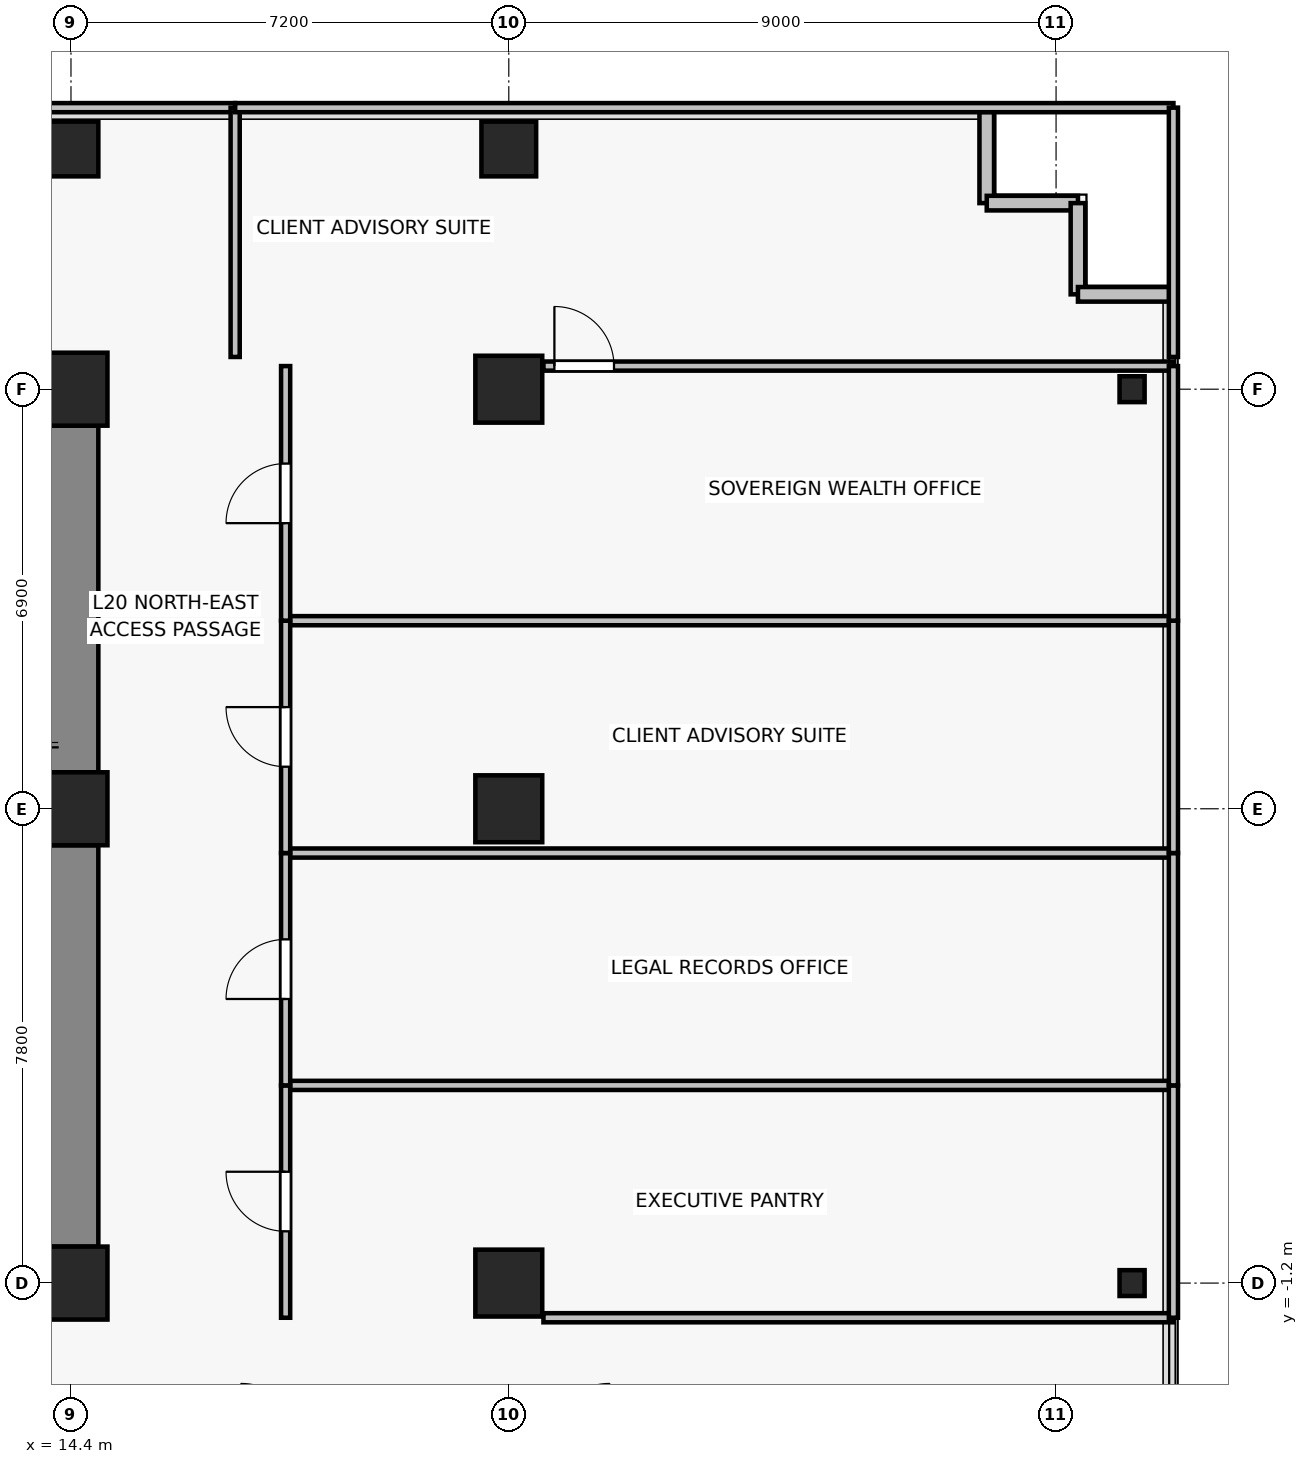
"""IFC4 building model, lengths in metres.
Left out: names, types, materials, properties, quantities, classifications, styles, units other than length and angle.
Written with IfcOpenShell. Run it as: python <this file> out.ifc"""

import sys

from ifc_helpers import new_model, si_unit, direction, frame, frame_2d, origin, origin_2d, place, context, subcontext, project, spatial, rectangle, i_section, extrude, source, transform, mapped, element, fill, save


model = new_model("IFC4")
c1 = context("Model", 3, precision=1e-05, world=origin(), true_north=direction((0.0, 1.0)))
c2 = subcontext(c1, "Body", "Model", "MODEL_VIEW")
j1 = project(units=[si_unit("LENGTHUNIT", "METRE"), si_unit("PLANEANGLEUNIT", "RADIAN")], contexts=[c1])
p1 = place(None, origin())
s1 = spatial("IfcSite", under=j1, at=p1, CompositionType="ELEMENT")
p2 = place(p1, origin())
s2 = spatial("IfcBuilding", under=s1, at=p2, CompositionType="ELEMENT")
p3 = place(p2, frame((0.0, 0.0, 73.6)))
s3 = spatial("IfcBuildingStorey", under=s2, at=p3, CompositionType="ELEMENT", Elevation=73.6)
for number, where, z_axis, x_axis in (
    (1, (14.4, -1.2, 0.0), (0.0, 0.0, 1.0), (1.0, 0.0, 0.0)),
    (2, (14.4, 6.6, 0.0), (0.0, 0.0, 1.0), (1.0, 0.0, 0.0)),
    (3, (14.4, 13.5, 0.0), (0.0, 0.0, 1.0), (1.0, 0.0, 0.0)),
):
    element("IfcColumn", number, at=place(p3, frame(where, z_axis=z_axis, x_axis=x_axis)), inside=s3, PredefinedType="COLUMN", context=c2, shape_type="SweptSolid", body=[
        extrude(rectangle(XDim=1.2, YDim=1.2, at=origin_2d()), origin(), (0.0, 0.0, 1.0), 3.3),
    ])
for number, where, z_axis, x_axis in (
    (4, (21.6, -1.2, 0.0), (0.0, 0.0, 1.0), (1.0, 0.0, 0.0)),
    (5, (21.6, 6.6, 0.0), (0.0, 0.0, 1.0), (1.0, 0.0, 0.0)),
    (6, (21.6, 13.5, 0.0), (0.0, 0.0, 1.0), (1.0, 0.0, 0.0)),
):
    element("IfcColumn", number, at=place(p3, frame(where, z_axis=z_axis, x_axis=x_axis)), inside=s3, PredefinedType="COLUMN", context=c2, shape_type="SweptSolid", body=[
        extrude(rectangle(XDim=1.1, YDim=1.1, at=origin_2d()), origin(), (0.0, 0.0, 1.0), 3.3),
    ])
for number, where, z_axis, x_axis in (
    (7, (14.4, 17.45, 0.0), (0.0, 0.0, 1.0), (1.0, 0.0, 0.0)),
    (8, (21.6, 17.45, 0.0), (0.0, 0.0, 1.0), (1.0, 0.0, 0.0)),
):
    element("IfcColumn", number, at=place(p3, frame(where, z_axis=z_axis, x_axis=x_axis)), inside=s3, PredefinedType="COLUMN", context=c2, shape_type="SweptSolid", body=[
        extrude(rectangle(XDim=0.9, YDim=0.9, at=origin_2d()), origin(), (0.0, 0.0, 1.0), 3.3),
    ])
for number, where, z_axis, x_axis in (
    (9, (31.85, -1.2, 0.0), (0.0, 0.0, 1.0), (1.0, 0.0, 0.0)),
    (10, (31.85, 13.5, 0.0), (0.0, 0.0, 1.0), (1.0, 0.0, 0.0)),
):
    element("IfcColumn", number, at=place(p3, frame(where, z_axis=z_axis, x_axis=x_axis)), inside=s3, PredefinedType="COLUMN", context=c2, shape_type="SweptSolid", body=[
        extrude(i_section(OverallWidth=0.412, OverallDepth=0.425, WebThickness=0.026, FlangeThickness=0.039, FilletRadius=0.015, at=origin_2d()), origin(), (0.0, 0.0, 1.0), 3.3),
    ])
p4 = place(p3, frame((14.4, -0.6, 0.0), z_axis=(0.0, 0.0, 1.0), x_axis=(0.0, 1.0, 0.0)))
e11 = element("IfcWall", 11, at=p4, inside=s3, PredefinedType="SHEAR", context=c2, shape_type="SweptSolid", body=[
    extrude(rectangle(XDim=6.6, YDim=0.9, at=frame_2d((3.3, 0.0))), origin(), (0.0, 0.0, 1.0), 3.075),
])
p5 = place(p3, frame((14.4, 7.2, 0.0), z_axis=(0.0, 0.0, 1.0), x_axis=(0.0, 1.0, 0.0)))
e12 = element("IfcWall", 12, at=p5, inside=s3, PredefinedType="SHEAR", context=c2, shape_type="SweptSolid", body=[
    extrude(rectangle(XDim=5.7, YDim=0.9, at=frame_2d((2.85, 0.0))), origin(), (0.0, 0.0, 1.0), 3.075),
])
for number, where, z_axis, x_axis in (
    (13, (29.46, 16.56, 0.0), (0.0, 0.0, 1.0), (0.0, 1.0, 0.0)),
    (14, (30.96, 16.56, 0.0), (0.0, 0.0, 1.0), (-1.0, 0.0, 0.0)),
    (15, (30.96, 15.06, 0.0), (0.0, 0.0, 1.0), (0.0, 1.0, 0.0)),
    (16, (32.46, 15.06, 0.0), (0.0, 0.0, 1.0), (-1.0, 0.0, 0.0)),
):
    element("IfcWall", number, at=place(p3, frame(where, z_axis=z_axis, x_axis=x_axis)), inside=s3, PredefinedType="SOLIDWALL", context=c2, shape_type="SweptSolid", body=[
        extrude(rectangle(XDim=1.5, YDim=0.24, at=frame_2d((0.75, 0.0))), origin(), (0.0, 0.0, 1.0), 3.075),
    ])
p6 = place(p3, frame((32.53, -1.77, 0.0), z_axis=(0.0, 0.0, 1.0), x_axis=(-1.0, 0.0, 0.0)))
e17 = element("IfcWall", 17, at=p6, inside=s3, PredefinedType="PARTITIONING", context=c2, shape_type="SweptSolid", body=[
    extrude(rectangle(XDim=10.36, YDim=0.15, at=frame_2d((5.18, 0.0))), origin(), (0.0, 0.0, 1.0), 2.465),
])
p7 = place(p3, frame((17.93, 2.051, 0.0), z_axis=(0.0, 0.0, 1.0), x_axis=(1.0, 0.0, 0.0)))
e18 = element("IfcWall", 18, at=p7, inside=s3, PredefinedType="PARTITIONING", context=c2, shape_type="SweptSolid", body=[
    extrude(rectangle(XDim=14.6, YDim=0.15, at=frame_2d((7.3, 0.0))), origin(), (0.0, 0.0, 1.0), 2.465),
])
p8 = place(p3, frame((17.93, -1.77, 0.0), z_axis=(0.0, 0.0, 1.0), x_axis=(0.0, 1.0, 0.0)))
e19 = element("IfcWall", 19, at=p8, inside=s3, PredefinedType="PARTITIONING", context=c2, shape_type="SweptSolid", body=[
    extrude(rectangle(XDim=3.821, YDim=0.15, at=frame_2d((1.911, 0.0))), origin(), (0.0, 0.0, 1.0), 2.465),
])
p9 = place(p8, frame((1.421, 0.0, 0.0)))
e20 = element("IfcOpeningElement", 20, at=p9, cuts=e19, PredefinedType="OPENING", context=c2, shape_type="SweptSolid", body=[
    extrude(rectangle(XDim=0.98, YDim=2.15, at=frame_2d((0.49, 1.075))), frame((0.0, 0.085, 0.0), z_axis=(0.0, -1.0, 0.0), x_axis=(1.0, 0.0, 0.0)), (0.0, 0.0, 1.0), 0.17),
])
p10 = place(p3, frame((32.53, 2.051, 0.0), z_axis=(0.0, 0.0, 1.0), x_axis=(0.0, -1.0, 0.0)))
e21 = element("IfcWall", 21, at=p10, inside=s3, PredefinedType="PARTITIONING", context=c2, shape_type="SweptSolid", body=[
    extrude(rectangle(XDim=3.821, YDim=0.15, at=frame_2d((1.911, 0.0))), origin(), (0.0, 0.0, 1.0), 3.075),
])
p11 = place(p3, frame((17.93, 5.872, 0.0), z_axis=(0.0, 0.0, 1.0), x_axis=(1.0, 0.0, 0.0)))
e22 = element("IfcWall", 22, at=p11, inside=s3, PredefinedType="PARTITIONING", context=c2, shape_type="SweptSolid", body=[
    extrude(rectangle(XDim=14.6, YDim=0.15, at=frame_2d((7.3, 0.0))), origin(), (0.0, 0.0, 1.0), 2.465),
])
p12 = place(p3, frame((17.93, 2.051, 0.0), z_axis=(0.0, 0.0, 1.0), x_axis=(0.0, 1.0, 0.0)))
e23 = element("IfcWall", 23, at=p12, inside=s3, PredefinedType="PARTITIONING", context=c2, shape_type="SweptSolid", body=[
    extrude(rectangle(XDim=3.821, YDim=0.15, at=frame_2d((1.911, 0.0))), origin(), (0.0, 0.0, 1.0), 3.075),
])
p13 = place(p12, frame((1.421, 0.0, 0.0)))
e24 = element("IfcOpeningElement", 24, at=p13, cuts=e23, PredefinedType="OPENING", context=c2, shape_type="SweptSolid", body=[
    extrude(rectangle(XDim=0.98, YDim=2.15, at=frame_2d((0.49, 1.075))), frame((0.0, 0.085, 0.0), z_axis=(0.0, -1.0, 0.0), x_axis=(1.0, 0.0, 0.0)), (0.0, 0.0, 1.0), 0.17),
])
p14 = place(p3, frame((32.53, 5.872, 0.0), z_axis=(0.0, 0.0, 1.0), x_axis=(0.0, -1.0, 0.0)))
e25 = element("IfcWall", 25, at=p14, inside=s3, PredefinedType="PARTITIONING", context=c2, shape_type="SweptSolid", body=[
    extrude(rectangle(XDim=3.821, YDim=0.15, at=frame_2d((1.911, 0.0))), origin(), (0.0, 0.0, 1.0), 3.075),
])
p15 = place(p3, frame((17.93, 9.693, 0.0), z_axis=(0.0, 0.0, 1.0), x_axis=(1.0, 0.0, 0.0)))
e26 = element("IfcWall", 26, at=p15, inside=s3, PredefinedType="PARTITIONING", context=c2, shape_type="SweptSolid", body=[
    extrude(rectangle(XDim=14.6, YDim=0.15, at=frame_2d((7.3, 0.0))), origin(), (0.0, 0.0, 1.0), 2.465),
])
p16 = place(p3, frame((17.93, 5.872, 0.0), z_axis=(0.0, 0.0, 1.0), x_axis=(0.0, 1.0, 0.0)))
e27 = element("IfcWall", 27, at=p16, inside=s3, PredefinedType="PARTITIONING", context=c2, shape_type="SweptSolid", body=[
    extrude(rectangle(XDim=3.821, YDim=0.15, at=frame_2d((1.911, 0.0))), origin(), (0.0, 0.0, 1.0), 2.465),
])
p17 = place(p16, frame((1.42, 0.0, 0.0)))
e28 = element("IfcOpeningElement", 28, at=p17, cuts=e27, PredefinedType="OPENING", context=c2, shape_type="SweptSolid", body=[
    extrude(rectangle(XDim=0.98, YDim=2.15, at=frame_2d((0.49, 1.075))), frame((0.0, 0.085, 0.0), z_axis=(0.0, -1.0, 0.0), x_axis=(1.0, 0.0, 0.0)), (0.0, 0.0, 1.0), 0.17),
])
p18 = place(p3, frame((32.53, 9.693, 0.0), z_axis=(0.0, 0.0, 1.0), x_axis=(0.0, -1.0, 0.0)))
e29 = element("IfcWall", 29, at=p18, inside=s3, PredefinedType="PARTITIONING", context=c2, shape_type="SweptSolid", body=[
    extrude(rectangle(XDim=3.821, YDim=0.15, at=frame_2d((1.911, 0.0))), origin(), (0.0, 0.0, 1.0), 3.075),
])
p19 = place(p3, frame((22.17, 13.88, 0.0), z_axis=(0.0, 0.0, 1.0), x_axis=(1.0, 0.0, 0.0)))
e30 = element("IfcWall", 30, at=p19, inside=s3, PredefinedType="PARTITIONING", context=c2, shape_type="SweptSolid", body=[
    extrude(rectangle(XDim=10.36, YDim=0.15, at=frame_2d((5.18, 0.0))), origin(), (0.0, 0.0, 1.0), 3.075),
])
p20 = place(p19, frame((0.18, 0.0, 0.0)))
e31 = element("IfcOpeningElement", 31, at=p20, cuts=e30, PredefinedType="OPENING", context=c2, shape_type="SweptSolid", body=[
    extrude(rectangle(XDim=0.98, YDim=2.15, at=frame_2d((0.49, 1.075))), frame((0.0, 0.085, 0.0), z_axis=(0.0, -1.0, 0.0), x_axis=(1.0, 0.0, 0.0)), (0.0, 0.0, 1.0), 0.17),
])
p21 = place(p3, frame((17.93, 9.693, 0.0), z_axis=(0.0, 0.0, 1.0), x_axis=(0.0, 1.0, 0.0)))
e32 = element("IfcWall", 32, at=p21, inside=s3, PredefinedType="PARTITIONING", context=c2, shape_type="SweptSolid", body=[
    extrude(rectangle(XDim=4.187, YDim=0.15, at=frame_2d((2.093, 0.0))), origin(), (0.0, 0.0, 1.0), 2.465),
])
p22 = place(p21, frame((1.604, 0.0, 0.0)))
e33 = element("IfcOpeningElement", 33, at=p22, cuts=e32, PredefinedType="OPENING", context=c2, shape_type="SweptSolid", body=[
    extrude(rectangle(XDim=0.98, YDim=2.15, at=frame_2d((0.49, 1.075))), frame((0.0, 0.085, 0.0), z_axis=(0.0, -1.0, 0.0), x_axis=(1.0, 0.0, 0.0)), (0.0, 0.0, 1.0), 0.17),
])
p23 = place(p3, frame((32.53, 13.88, 0.0), z_axis=(0.0, 0.0, 1.0), x_axis=(0.0, -1.0, 0.0)))
e34 = element("IfcWall", 34, at=p23, inside=s3, PredefinedType="PARTITIONING", context=c2, shape_type="SweptSolid", body=[
    extrude(rectangle(XDim=4.187, YDim=0.15, at=frame_2d((2.093, 0.0))), origin(), (0.0, 0.0, 1.0), 3.075),
])
p24 = place(p3, frame((-28.53, 18.13, 0.0), z_axis=(0.0, 0.0, 1.0), x_axis=(1.0, 0.0, 0.0)))
e35 = element("IfcWall", 35, at=p24, inside=s3, PredefinedType="PARTITIONING", context=c2, shape_type="SweptSolid", body=[
    extrude(rectangle(XDim=45.63, YDim=0.15, at=frame_2d((22.815, 0.0))), origin(), (0.0, 0.0, 1.0), 3.075),
])
p25 = place(p3, frame((17.1, 18.13, 0.0), z_axis=(0.0, 0.0, 1.0), x_axis=(0.0, -1.0, 0.0)))
e36 = element("IfcWall", 36, at=p25, inside=s3, PredefinedType="PARTITIONING", context=c2, shape_type="SweptSolid", body=[
    extrude(rectangle(XDim=4.1, YDim=0.15, at=frame_2d((2.05, 0.0))), origin(), (0.0, 0.0, 1.0), 2.465),
])
p26 = place(p3, frame((17.1, 18.13, 0.0), z_axis=(0.0, 0.0, 1.0), x_axis=(1.0, 0.0, 0.0)))
e37 = element("IfcWall", 37, at=p26, inside=s3, PredefinedType="PARTITIONING", context=c2, shape_type="SweptSolid", body=[
    extrude(rectangle(XDim=15.43, YDim=0.15, at=frame_2d((7.715, 0.0))), origin(), (0.0, 0.0, 1.0), 3.075),
])
p27 = place(p3, frame((32.53, 18.13, 0.0), z_axis=(0.0, 0.0, 1.0), x_axis=(0.0, -1.0, 0.0)))
e38 = element("IfcWall", 38, at=p27, inside=s3, PredefinedType="PARTITIONING", context=c2, shape_type="SweptSolid", body=[
    extrude(rectangle(XDim=4.1, YDim=0.15, at=frame_2d((2.05, 0.0))), origin(), (0.0, 0.0, 1.0), 3.075),
])
m1 = source(origin(), c2, "Body", "SweptSolid", [
    extrude(rectangle(XDim=0.98, YDim=2.15, at=frame_2d((0.49, 1.075))), frame((0.0, 0.025, 0.0), z_axis=(0.0, -1.0, 0.0), x_axis=(1.0, 0.0, 0.0)), (0.0, 0.0, 1.0), 0.05),
])
p28 = place(p9, origin())
e39 = element("IfcDoor", 39, at=p28, inside=s3, OperationType="SINGLE_SWING_RIGHT", PredefinedType="DOOR", context=c2, shape_type="MappedRepresentation", body=[
    mapped(m1, transform((0.0, 0.0, 0.0), x_axis=(1.0, 0.0, 0.0), y_axis=(0.0, 1.0, 0.0), z_axis=(0.0, 0.0, 1.0), scale=1.0)),
])
fill(e20, e39)
p29 = place(p13, origin())
e40 = element("IfcDoor", 40, at=p29, inside=s3, OperationType="SINGLE_SWING_LEFT", PredefinedType="DOOR", context=c2, shape_type="MappedRepresentation", body=[
    mapped(m1, transform((0.0, 0.0, 0.0), x_axis=(1.0, 0.0, 0.0), y_axis=(0.0, 1.0, 0.0), z_axis=(0.0, 0.0, 1.0), scale=1.0)),
])
fill(e24, e40)
p30 = place(p17, origin())
e41 = element("IfcDoor", 41, at=p30, inside=s3, OperationType="SINGLE_SWING_RIGHT", PredefinedType="DOOR", context=c2, shape_type="MappedRepresentation", body=[
    mapped(m1, transform((0.0, 0.0, 0.0), x_axis=(1.0, 0.0, 0.0), y_axis=(0.0, 1.0, 0.0), z_axis=(0.0, 0.0, 1.0), scale=1.0)),
])
fill(e28, e41)
p31 = place(p22, origin())
e42 = element("IfcDoor", 42, at=p31, inside=s3, OperationType="SINGLE_SWING_LEFT", PredefinedType="DOOR", context=c2, shape_type="MappedRepresentation", body=[
    mapped(m1, transform((0.0, 0.0, 0.0), x_axis=(1.0, 0.0, 0.0), y_axis=(0.0, 1.0, 0.0), z_axis=(0.0, 0.0, 1.0), scale=1.0)),
])
fill(e33, e42)
p32 = place(p20, origin())
e43 = element("IfcDoor", 43, at=p32, inside=s3, OperationType="SINGLE_SWING_LEFT", PredefinedType="DOOR", context=c2, shape_type="MappedRepresentation", body=[
    mapped(m1, transform((0.0, 0.0, 0.0), x_axis=(1.0, 0.0, 0.0), y_axis=(0.0, 1.0, 0.0), z_axis=(0.0, 0.0, 1.0), scale=1.0)),
])
fill(e31, e43)
save(model, sys.argv[1])
